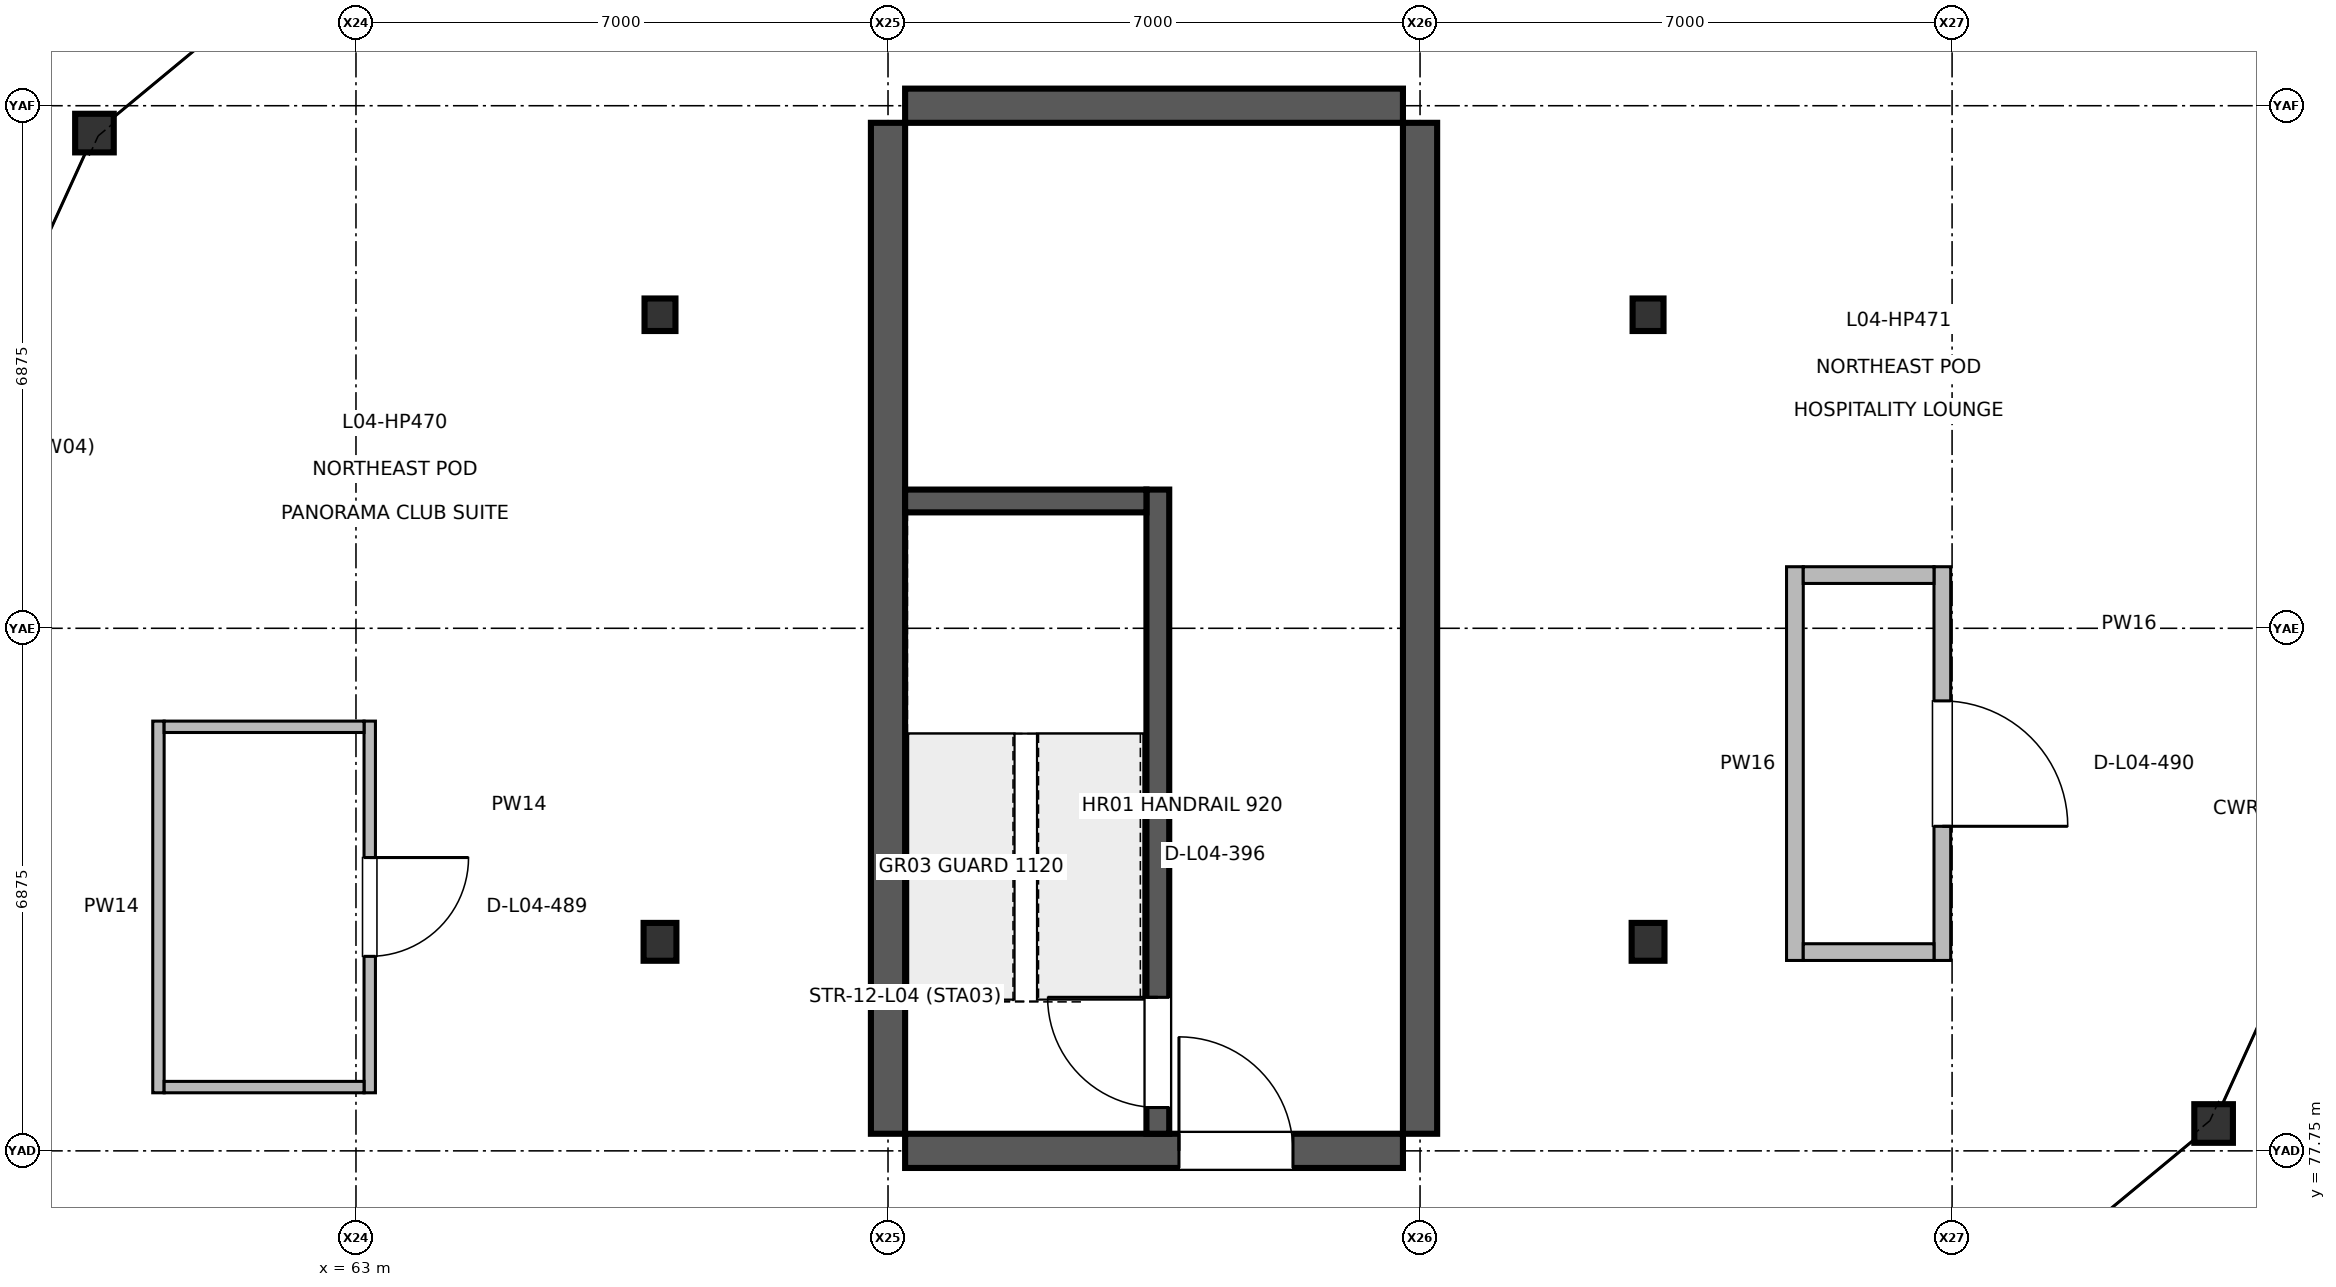
"""IFC4 building model, lengths in metres.
Left out: names, types, materials, properties, quantities, classifications, styles, units other than length and angle.
Written with IfcOpenShell. Run it as: python <this file> out.ifc"""

import sys

from ifc_helpers import new_model, si_unit, direction, frame, frame_2d, origin, origin_2d, place, context, subcontext, project, spatial, rectangle, hollow_circle, i_section, extrude, element, fill, save


model = new_model("IFC4")
c1 = context("Model", 3, precision=1e-05, world=origin(), true_north=direction((0.0, 1.0)))
c2 = subcontext(c1, "Body", "Model", "MODEL_VIEW")
j1 = project(units=[si_unit("LENGTHUNIT", "METRE"), si_unit("PLANEANGLEUNIT", "RADIAN")], contexts=[c1])
p1 = place(None, origin())
s1 = spatial("IfcSite", under=j1, at=p1, CompositionType="ELEMENT")
p2 = place(p1, origin())
s2 = spatial("IfcBuilding", under=s1, at=p2, CompositionType="ELEMENT")
p3 = place(p2, frame((0.0, 0.0, 16.2)))
s3 = spatial("IfcBuildingStorey", under=s2, at=p3, CompositionType="ELEMENT", Elevation=16.2)
for number, where, z_axis, x_axis in (
    (1, (67.0, 80.5, 0.0), (0.0, 0.0, 1.0), (1.0, 0.0, 0.0)),
    (2, (80.0, 80.5, 0.0), (0.0, 0.0, 1.0), (1.0, 0.0, 0.0)),
):
    element("IfcColumn", number, at=place(p3, frame(where, z_axis=z_axis, x_axis=x_axis)), inside=s3, PredefinedType="COLUMN", context=c2, shape_type="SweptSolid", body=[
        extrude(i_section(OverallWidth=0.432, OverallDepth=0.498, WebThickness=0.024, FlangeThickness=0.038, at=origin_2d()), origin(), (0.0, 0.0, 1.0), 4.798),
    ])
for number, where, z_axis, x_axis in (
    (3, (67.0, 88.75, 0.0), (0.0, 0.0, 1.0), (1.0, 0.0, 0.0)),
    (4, (80.0, 88.75, 0.0), (0.0, 0.0, 1.0), (1.0, 0.0, 0.0)),
):
    element("IfcColumn", number, at=place(p3, frame(where, z_axis=z_axis, x_axis=x_axis)), inside=s3, PredefinedType="COLUMN", context=c2, shape_type="SweptSolid", body=[
        extrude(i_section(OverallWidth=0.407, OverallDepth=0.428, WebThickness=0.02, FlangeThickness=0.035, at=origin_2d()), origin(), (0.0, 0.0, 1.0), 4.798),
    ])
for number, where, z_axis, x_axis in (
    (5, (59.559, 91.14, 0.0), (0.0, 0.0, 1.0), (1.0, 0.0, 0.0)),
    (6, (87.441, 78.11, 0.0), (0.0, 0.0, 1.0), (1.0, 0.0, 0.0)),
):
    element("IfcColumn", number, at=place(p3, frame(where, z_axis=z_axis, x_axis=x_axis)), inside=s3, PredefinedType="COLUMN", context=c2, shape_type="SweptSolid", body=[
        extrude(hollow_circle(Radius=0.254, WallThickness=0.025, at=origin_2d()), origin(), (0.0, 0.0, 1.0), 4.798),
    ])
for number, where, z_axis, x_axis in (
    (7, (70.0, 77.975, 0.0), (0.0, 0.0, 1.0), (0.0, 1.0, 0.0)),
    (8, (77.0, 77.975, 0.0), (0.0, 0.0, 1.0), (0.0, 1.0, 0.0)),
):
    element("IfcWall", number, at=place(p3, frame(where, z_axis=z_axis, x_axis=x_axis)), inside=s3, PredefinedType="SHEAR", context=c2, shape_type="SweptSolid", body=[
        extrude(rectangle(XDim=13.3, YDim=0.45, at=frame_2d((6.65, 0.0))), origin(), (0.0, 0.0, 1.0), 4.52),
    ])
p4 = place(p3, frame((70.225, 77.75, 0.0), z_axis=(0.0, 0.0, 1.0), x_axis=(1.0, 0.0, 0.0)))
e9 = element("IfcWall", 9, at=p4, inside=s3, PredefinedType="SHEAR", context=c2, shape_type="SweptSolid", body=[
    extrude(rectangle(XDim=6.55, YDim=0.45, at=frame_2d((3.275, 0.0))), origin(), (0.0, 0.0, 1.0), 4.52),
])
p5 = place(p4, frame((3.603, 0.0, 0.0)))
e10 = element("IfcOpeningElement", 10, at=p5, cuts=e9, PredefinedType="OPENING", context=c2, shape_type="SweptSolid", body=[
    extrude(rectangle(XDim=1.5, YDim=2.2, at=frame_2d((0.75, 1.1))), frame((0.0, 0.235, 0.0), z_axis=(0.0, -1.0, 0.0), x_axis=(1.0, 0.0, 0.0)), (0.0, 0.0, 1.0), 0.47),
])
p6 = place(p3, frame((70.225, 91.5, 0.0), z_axis=(0.0, 0.0, 1.0), x_axis=(1.0, 0.0, 0.0)))
e11 = element("IfcWall", 11, at=p6, inside=s3, PredefinedType="SHEAR", context=c2, shape_type="SweptSolid", body=[
    extrude(rectangle(XDim=6.55, YDim=0.45, at=frame_2d((3.275, 0.0))), origin(), (0.0, 0.0, 1.0), 4.52),
])
p7 = place(p3, frame((73.55, 77.975, 0.0), z_axis=(0.0, 0.0, 1.0), x_axis=(0.0, 1.0, 0.0)))
e12 = element("IfcWall", 12, at=p7, inside=s3, PredefinedType="SHEAR", context=c2, shape_type="SweptSolid", body=[
    extrude(rectangle(XDim=8.475, YDim=0.3, at=frame_2d((4.237, 0.0))), origin(), (0.0, 0.0, 1.0), 4.52),
])
p8 = place(p7, frame((0.345, 0.0, 0.0)))
e13 = element("IfcOpeningElement", 13, at=p8, cuts=e12, PredefinedType="OPENING", context=c2, shape_type="SweptSolid", body=[
    extrude(rectangle(XDim=1.45, YDim=2.2, at=frame_2d((0.725, 1.1))), frame((0.0, 0.16, 0.0), z_axis=(0.0, -1.0, 0.0), x_axis=(1.0, 0.0, 0.0)), (0.0, 0.0, 1.0), 0.32),
])
p9 = place(p3, frame((63.181, 83.404, 0.0), z_axis=(0.0, 0.0, 1.0), x_axis=(0.0, -1.0, 0.0)))
e14 = element("IfcWall", 14, at=p9, inside=s3, PredefinedType="PARTITIONING", context=c2, shape_type="SweptSolid", body=[
    extrude(rectangle(XDim=4.89, YDim=0.15, at=frame_2d((2.445, 0.0))), origin(), (0.0, 0.0, 1.0), 3.82),
])
p10 = place(p9, frame((1.795, 0.0, 0.0)))
e15 = element("IfcOpeningElement", 15, at=p10, cuts=e14, PredefinedType="OPENING", context=c2, shape_type="SweptSolid", body=[
    extrude(rectangle(XDim=1.3, YDim=2.3, at=frame_2d((0.65, 1.15))), frame((0.0, 0.085, 0.0), z_axis=(0.0, -1.0, 0.0), x_axis=(1.0, 0.0, 0.0)), (0.0, 0.0, 1.0), 0.17),
])
p11 = place(p3, frame((83.872, 85.435, 0.0), z_axis=(0.0, 0.0, 1.0), x_axis=(0.0, -1.0, 0.0)))
e16 = element("IfcWall", 16, at=p11, inside=s3, PredefinedType="PARTITIONING", context=c2, shape_type="SweptSolid", body=[
    extrude(rectangle(XDim=5.18, YDim=0.22, at=frame_2d((2.59, 0.0))), origin(), (0.0, 0.0, 1.0), 3.82),
])
p12 = place(p11, frame((1.765, 0.0, 0.0)))
e17 = element("IfcOpeningElement", 17, at=p12, cuts=e16, PredefinedType="OPENING", context=c2, shape_type="SweptSolid", body=[
    extrude(rectangle(XDim=1.65, YDim=2.3, at=frame_2d((0.825, 1.15))), frame((0.0, 0.12, 0.0), z_axis=(0.0, -1.0, 0.0), x_axis=(1.0, 0.0, 0.0)), (0.0, 0.0, 1.0), 0.24),
])
p13 = place(p3, frame((60.401, 78.514, 0.0), z_axis=(0.0, 0.0, 1.0), x_axis=(0.0, 1.0, 0.0)))
e18 = element("IfcWall", 18, at=p13, inside=s3, PredefinedType="PARTITIONING", context=c2, shape_type="SweptSolid", body=[
    extrude(rectangle(XDim=4.89, YDim=0.15, at=frame_2d((2.445, 0.0))), origin(), (0.0, 0.0, 1.0), 3.82),
])
for number, where, z_axis, x_axis in (
    (19, (60.476, 78.589, 0.0), (0.0, 0.0, 1.0), (1.0, 0.0, 0.0)),
    (20, (60.476, 83.329, 0.0), (0.0, 0.0, 1.0), (1.0, 0.0, 0.0)),
):
    element("IfcWall", number, at=place(p3, frame(where, z_axis=z_axis, x_axis=x_axis)), inside=s3, PredefinedType="PARTITIONING", context=c2, shape_type="SweptSolid", body=[
        extrude(rectangle(XDim=2.63, YDim=0.15, at=frame_2d((1.315, 0.0))), origin(), (0.0, 0.0, 1.0), 3.82),
    ])
p14 = place(p3, frame((81.932, 80.255, 0.0), z_axis=(0.0, 0.0, 1.0), x_axis=(0.0, 1.0, 0.0)))
e21 = element("IfcWall", 21, at=p14, inside=s3, PredefinedType="PARTITIONING", context=c2, shape_type="SweptSolid", body=[
    extrude(rectangle(XDim=5.18, YDim=0.22, at=frame_2d((2.59, 0.0))), origin(), (0.0, 0.0, 1.0), 3.82),
])
for number, where, z_axis, x_axis in (
    (22, (82.042, 80.365, 0.0), (0.0, 0.0, 1.0), (1.0, 0.0, 0.0)),
    (23, (82.042, 85.325, 0.0), (0.0, 0.0, 1.0), (1.0, 0.0, 0.0)),
):
    element("IfcWall", number, at=place(p3, frame(where, z_axis=z_axis, x_axis=x_axis)), inside=s3, PredefinedType="PARTITIONING", context=c2, shape_type="SweptSolid", body=[
        extrude(rectangle(XDim=1.72, YDim=0.22, at=frame_2d((0.86, 0.0))), origin(), (0.0, 0.0, 1.0), 3.82),
    ])
p15 = place(p3, frame((70.225, 86.3, 0.0), z_axis=(0.0, 0.0, 1.0), x_axis=(1.0, 0.0, 0.0)))
e24 = element("IfcWall", 24, at=p15, inside=s3, PredefinedType="SHEAR", context=c2, shape_type="SweptSolid", body=[
    extrude(rectangle(XDim=3.175, YDim=0.3, at=frame_2d((1.587, 0.0))), origin(), (0.0, 0.0, 1.0), 4.52),
])
p16 = place(p5, origin())
e25 = element("IfcDoor", 25, at=p16, inside=s3, OperationType="SINGLE_SWING_LEFT", PredefinedType="DOOR", context=c2, shape_type="SweptSolid", body=[
    extrude(rectangle(XDim=1.5, YDim=2.2, at=frame_2d((0.75, 1.1))), frame((0.0, 0.025, 0.0), z_axis=(0.0, -1.0, 0.0), x_axis=(1.0, 0.0, 0.0)), (0.0, 0.0, 1.0), 0.05),
])
fill(e10, e25)
p17 = place(p8, origin())
e26 = element("IfcDoor", 26, at=p17, inside=s3, OperationType="SINGLE_SWING_RIGHT", PredefinedType="DOOR", context=c2, shape_type="SweptSolid", body=[
    extrude(rectangle(XDim=1.45, YDim=2.2, at=frame_2d((0.725, 1.1))), frame((0.0, 0.025, 0.0), z_axis=(0.0, -1.0, 0.0), x_axis=(1.0, 0.0, 0.0)), (0.0, 0.0, 1.0), 0.05),
])
fill(e13, e26)
p18 = place(p10, origin())
e27 = element("IfcDoor", 27, at=p18, inside=s3, OperationType="SINGLE_SWING_LEFT", PredefinedType="DOOR", context=c2, shape_type="SweptSolid", body=[
    extrude(rectangle(XDim=1.3, YDim=2.3, at=frame_2d((0.65, 1.15))), frame((0.0, 0.025, 0.0), z_axis=(0.0, -1.0, 0.0), x_axis=(1.0, 0.0, 0.0)), (0.0, 0.0, 1.0), 0.05),
])
fill(e15, e27)
p19 = place(p12, origin())
e28 = element("IfcDoor", 28, at=p19, inside=s3, OperationType="SINGLE_SWING_RIGHT", PredefinedType="DOOR", context=c2, shape_type="SweptSolid", body=[
    extrude(rectangle(XDim=1.65, YDim=2.3, at=frame_2d((0.825, 1.15))), frame((0.0, 0.025, 0.0), z_axis=(0.0, -1.0, 0.0), x_axis=(1.0, 0.0, 0.0)), (0.0, 0.0, 1.0), 0.05),
])
fill(e17, e28)
save(model, sys.argv[1])
